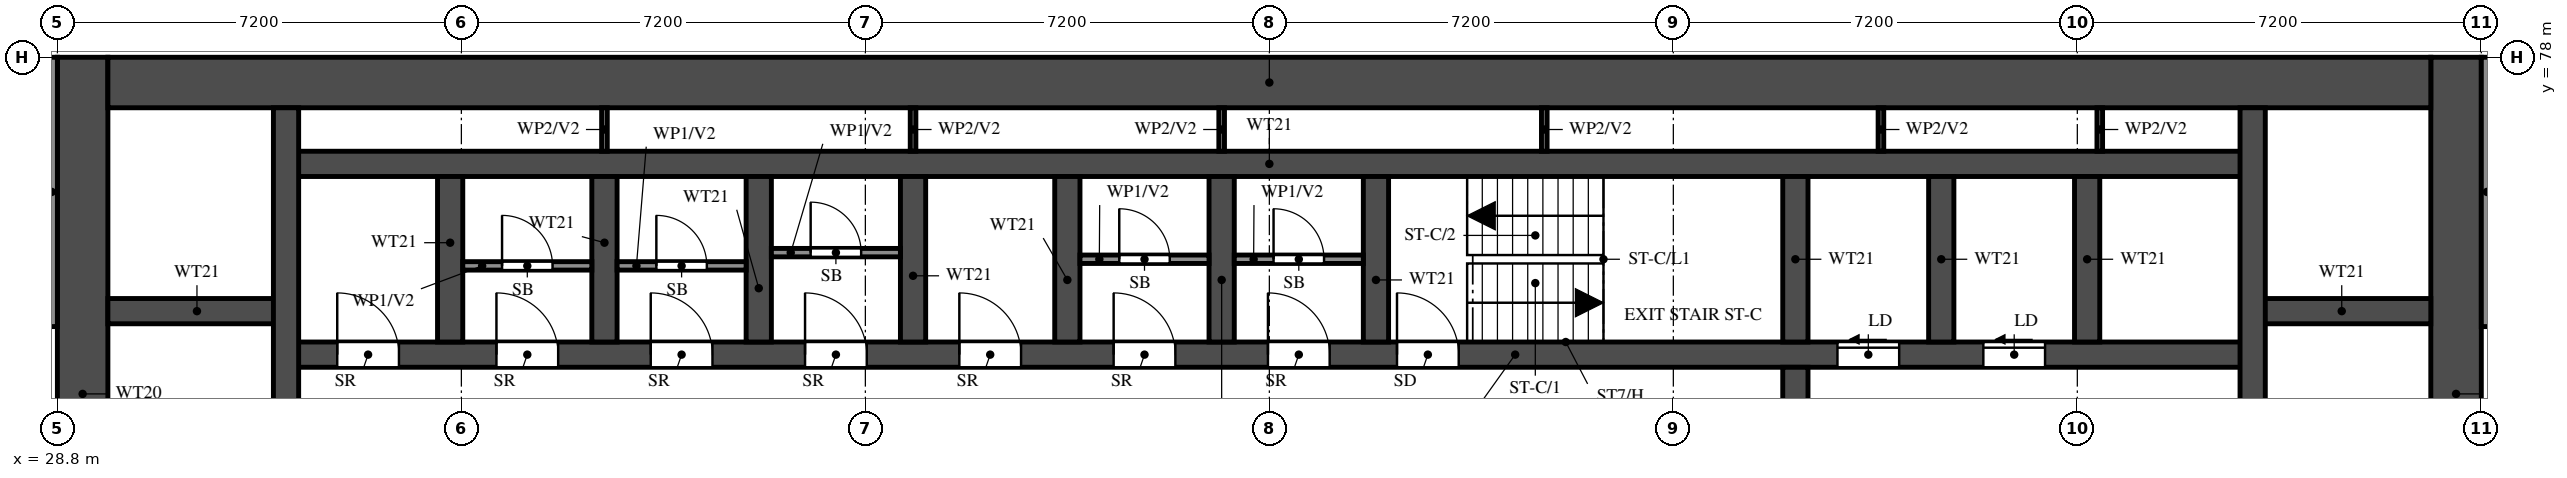
"""IFC4 building model, lengths in metres.
Left out: names, types, materials, properties, quantities, classifications, styles, units other than length and angle.
Written with IfcOpenShell. Run it as: python <this file> out.ifc"""

import sys

from ifc_helpers import new_model, si_unit, direction, frame, frame_2d, origin, place, context, subcontext, project, spatial, rectangle, extrude, element, fill, save


model = new_model("IFC4")
c1 = context("Model", 3, precision=1e-05, world=origin(), true_north=direction((0.0, 1.0)))
c2 = subcontext(c1, "Body", "Model", "MODEL_VIEW")
j1 = project(units=[si_unit("LENGTHUNIT", "METRE"), si_unit("PLANEANGLEUNIT", "RADIAN")], contexts=[c1])
p1 = place(None, origin())
s1 = spatial("IfcSite", under=j1, at=p1, CompositionType="ELEMENT")
p2 = place(p1, origin())
s2 = spatial("IfcBuilding", under=s1, at=p2, CompositionType="ELEMENT")
p3 = place(p2, frame((0.0, 0.0, 55.0)))
s3 = spatial("IfcBuildingStorey", under=s2, at=p3, CompositionType="ELEMENT", Elevation=55.0)
for number, where, z_axis, x_axis in (
    (1, (29.25, 66.0, 0.0), (0.0, 0.0, 1.0), (0.0, 1.0, 0.0)),
    (2, (71.55, 66.0, 0.0), (0.0, 0.0, 1.0), (0.0, 1.0, 0.0)),
):
    element("IfcWall", number, at=place(p3, frame(where, z_axis=z_axis, x_axis=x_axis)), inside=s3, PredefinedType="SHEAR", context=c2, shape_type="SweptSolid", body=[
        extrude(rectangle(XDim=12.0, YDim=0.9, at=frame_2d((6.0, 0.0))), origin(), (0.0, 0.0, 1.0), 3.18),
    ])
p4 = place(p3, frame((29.7, 77.55, 0.0), z_axis=(0.0, 0.0, 1.0), x_axis=(1.0, 0.0, 0.0)))
e3 = element("IfcWall", 3, at=p4, inside=s3, PredefinedType="SHEAR", context=c2, shape_type="SweptSolid", body=[
    extrude(rectangle(XDim=41.4, YDim=0.9, at=frame_2d((20.7, 0.0))), origin(), (0.0, 0.0, 1.0), 3.18),
])
p5 = place(p3, frame((32.875, 72.7, 0.0), z_axis=(0.0, 0.0, 1.0), x_axis=(1.0, 0.0, 0.0)))
e4 = element("IfcWall", 4, at=p5, inside=s3, PredefinedType="SHEAR", context=c2, shape_type="SweptSolid", body=[
    extrude(rectangle(XDim=35.05, YDim=0.45, at=frame_2d((17.525, 0.0))), origin(), (0.0, 0.0, 1.0), 3.18),
])
p6 = place(p5, frame((19.8, 0.0, 0.0)))
e5 = element("IfcOpeningElement", 5, at=p6, cuts=e4, PredefinedType="OPENING", context=c2, shape_type="SweptSolid", body=[
    extrude(rectangle(XDim=1.1, YDim=2.1, at=frame_2d((0.55, 1.05))), frame((0.0, 0.235, 0.0), z_axis=(0.0, -1.0, 0.0), x_axis=(1.0, 0.0, 0.0)), (0.0, 0.0, 1.0), 0.47),
])
p7 = place(p5, frame((27.65, 0.0, 0.0)))
e6 = element("IfcOpeningElement", 6, at=p7, cuts=e4, PredefinedType="OPENING", context=c2, shape_type="SweptSolid", body=[
    extrude(rectangle(XDim=1.1, YDim=2.1, at=frame_2d((0.55, 1.05))), frame((0.0, 0.235, 0.0), z_axis=(0.0, -1.0, 0.0), x_axis=(1.0, 0.0, 0.0)), (0.0, 0.0, 1.0), 0.47),
])
p8 = place(p5, frame((30.25, 0.0, 0.0)))
e7 = element("IfcOpeningElement", 7, at=p8, cuts=e4, PredefinedType="OPENING", context=c2, shape_type="SweptSolid", body=[
    extrude(rectangle(XDim=1.1, YDim=2.1, at=frame_2d((0.55, 1.05))), frame((0.0, 0.235, 0.0), z_axis=(0.0, -1.0, 0.0), x_axis=(1.0, 0.0, 0.0)), (0.0, 0.0, 1.0), 0.47),
])
p9 = place(p5, frame((3.75, 0.0, 0.0)))
e8 = element("IfcOpeningElement", 8, at=p9, cuts=e4, PredefinedType="OPENING", context=c2, shape_type="SweptSolid", body=[
    extrude(rectangle(XDim=1.1, YDim=2.1, at=frame_2d((0.55, 1.05))), frame((0.0, 0.235, 0.0), z_axis=(0.0, -1.0, 0.0), x_axis=(1.0, 0.0, 0.0)), (0.0, 0.0, 1.0), 0.47),
])
p10 = place(p5, frame((6.5, 0.0, 0.0)))
e9 = element("IfcOpeningElement", 9, at=p10, cuts=e4, PredefinedType="OPENING", context=c2, shape_type="SweptSolid", body=[
    extrude(rectangle(XDim=1.1, YDim=2.1, at=frame_2d((0.55, 1.05))), frame((0.0, 0.235, 0.0), z_axis=(0.0, -1.0, 0.0), x_axis=(1.0, 0.0, 0.0)), (0.0, 0.0, 1.0), 0.47),
])
p11 = place(p5, frame((9.25, 0.0, 0.0)))
e10 = element("IfcOpeningElement", 10, at=p11, cuts=e4, PredefinedType="OPENING", context=c2, shape_type="SweptSolid", body=[
    extrude(rectangle(XDim=1.1, YDim=2.1, at=frame_2d((0.55, 1.05))), frame((0.0, 0.235, 0.0), z_axis=(0.0, -1.0, 0.0), x_axis=(1.0, 0.0, 0.0)), (0.0, 0.0, 1.0), 0.47),
])
p12 = place(p5, frame((12.0, 0.0, 0.0)))
e11 = element("IfcOpeningElement", 11, at=p12, cuts=e4, PredefinedType="OPENING", context=c2, shape_type="SweptSolid", body=[
    extrude(rectangle(XDim=1.1, YDim=2.1, at=frame_2d((0.55, 1.05))), frame((0.0, 0.235, 0.0), z_axis=(0.0, -1.0, 0.0), x_axis=(1.0, 0.0, 0.0)), (0.0, 0.0, 1.0), 0.47),
])
p13 = place(p5, frame((14.75, 0.0, 0.0)))
e12 = element("IfcOpeningElement", 12, at=p13, cuts=e4, PredefinedType="OPENING", context=c2, shape_type="SweptSolid", body=[
    extrude(rectangle(XDim=1.1, YDim=2.1, at=frame_2d((0.55, 1.05))), frame((0.0, 0.235, 0.0), z_axis=(0.0, -1.0, 0.0), x_axis=(1.0, 0.0, 0.0)), (0.0, 0.0, 1.0), 0.47),
])
p14 = place(p5, frame((17.5, 0.0, 0.0)))
e13 = element("IfcOpeningElement", 13, at=p14, cuts=e4, PredefinedType="OPENING", context=c2, shape_type="SweptSolid", body=[
    extrude(rectangle(XDim=1.1, YDim=2.1, at=frame_2d((0.55, 1.05))), frame((0.0, 0.235, 0.0), z_axis=(0.0, -1.0, 0.0), x_axis=(1.0, 0.0, 0.0)), (0.0, 0.0, 1.0), 0.47),
])
p15 = place(p5, frame((0.913, 0.0, 0.0)))
e14 = element("IfcOpeningElement", 14, at=p15, cuts=e4, PredefinedType="OPENING", context=c2, shape_type="SweptSolid", body=[
    extrude(rectangle(XDim=1.1, YDim=2.1, at=frame_2d((0.55, 1.05))), frame((0.0, 0.235, 0.0), z_axis=(0.0, -1.0, 0.0), x_axis=(1.0, 0.0, 0.0)), (0.0, 0.0, 1.0), 0.47),
])
p16 = place(p3, frame((32.875, 76.1, 0.0), z_axis=(0.0, 0.0, 1.0), x_axis=(1.0, 0.0, 0.0)))
e15 = element("IfcWall", 15, at=p16, inside=s3, PredefinedType="SHEAR", context=c2, shape_type="SweptSolid", body=[
    extrude(rectangle(XDim=35.05, YDim=0.45, at=frame_2d((17.525, 0.0))), origin(), (0.0, 0.0, 1.0), 3.18),
])
for number, where, z_axis, x_axis in (
    (16, (29.7, 73.475, 0.0), (0.0, 0.0, 1.0), (1.0, 0.0, 0.0)),
    (17, (67.925, 73.475, 0.0), (0.0, 0.0, 1.0), (1.0, 0.0, 0.0)),
):
    element("IfcWall", number, at=place(p3, frame(where, z_axis=z_axis, x_axis=x_axis)), inside=s3, PredefinedType="SHEAR", context=c2, shape_type="SweptSolid", body=[
        extrude(rectangle(XDim=3.175, YDim=0.45, at=frame_2d((1.587, 0.0))), origin(), (0.0, 0.0, 1.0), 3.18),
    ])
p17 = place(p3, frame((32.875, 66.45, 0.0), z_axis=(0.0, 0.0, 1.0), x_axis=(0.0, 1.0, 0.0)))
e18 = element("IfcWall", 18, at=p17, inside=s3, PredefinedType="SHEAR", context=c2, shape_type="SweptSolid", body=[
    extrude(rectangle(XDim=10.65, YDim=0.45, at=frame_2d((5.325, 0.0))), origin(), (0.0, 0.0, 1.0), 3.18),
])
p18 = place(p3, frame((67.925, 66.45, 0.0), z_axis=(0.0, 0.0, 1.0), x_axis=(0.0, 1.0, 0.0)))
e19 = element("IfcWall", 19, at=p18, inside=s3, PredefinedType="SHEAR", context=c2, shape_type="SweptSolid", body=[
    extrude(rectangle(XDim=10.65, YDim=0.45, at=frame_2d((5.325, 0.0))), origin(), (0.0, 0.0, 1.0), 3.18),
])
p19 = place(p18, frame((0.15, 0.0, 0.0)))
e20 = element("IfcOpeningElement", 20, at=p19, cuts=e19, PredefinedType="OPENING", context=c2, shape_type="SweptSolid", body=[
    extrude(rectangle(XDim=1.1, YDim=2.1, at=frame_2d((0.55, 1.05))), frame((0.0, 0.235, 0.0), z_axis=(0.0, -1.0, 0.0), x_axis=(1.0, 0.0, 0.0)), (0.0, 0.0, 1.0), 0.47),
])
p20 = place(p3, frame((59.775, 66.45, 0.0), z_axis=(0.0, 0.0, 1.0), x_axis=(0.0, 1.0, 0.0)))
e21 = element("IfcWall", 21, at=p20, inside=s3, PredefinedType="SHEAR", context=c2, shape_type="SweptSolid", body=[
    extrude(rectangle(XDim=6.025, YDim=0.45, at=frame_2d((3.013, 0.0))), origin(), (0.0, 0.0, 1.0), 3.18),
])
p21 = place(p20, frame((3.85, 0.0, 0.0)))
e22 = element("IfcOpeningElement", 22, at=p21, cuts=e21, PredefinedType="OPENING", context=c2, shape_type="SweptSolid", body=[
    extrude(rectangle(XDim=1.2, YDim=2.1, at=frame_2d((0.6, 1.05))), frame((0.0, 0.235, 0.0), z_axis=(0.0, -1.0, 0.0), x_axis=(1.0, 0.0, 0.0)), (0.0, 0.0, 1.0), 0.47),
])
for number, where, z_axis, x_axis in (
    (23, (59.775, 72.925, 0.0), (0.0, 0.0, 1.0), (0.0, 1.0, 0.0)),
    (24, (35.8, 72.925, 0.0), (0.0, 0.0, 1.0), (0.0, 1.0, 0.0)),
    (25, (38.55, 72.925, 0.0), (0.0, 0.0, 1.0), (0.0, 1.0, 0.0)),
    (26, (41.3, 72.925, 0.0), (0.0, 0.0, 1.0), (0.0, 1.0, 0.0)),
    (27, (44.05, 72.925, 0.0), (0.0, 0.0, 1.0), (0.0, 1.0, 0.0)),
    (28, (46.8, 72.925, 0.0), (0.0, 0.0, 1.0), (0.0, 1.0, 0.0)),
    (29, (49.55, 72.925, 0.0), (0.0, 0.0, 1.0), (0.0, 1.0, 0.0)),
    (30, (52.3, 72.925, 0.0), (0.0, 0.0, 1.0), (0.0, 1.0, 0.0)),
    (31, (62.375, 72.925, 0.0), (0.0, 0.0, 1.0), (0.0, 1.0, 0.0)),
    (32, (64.975, 72.925, 0.0), (0.0, 0.0, 1.0), (0.0, 1.0, 0.0)),
):
    element("IfcWall", number, at=place(p3, frame(where, z_axis=z_axis, x_axis=x_axis)), inside=s3, PredefinedType="SHEAR", context=c2, shape_type="SweptSolid", body=[
        extrude(rectangle(XDim=2.95, YDim=0.45, at=frame_2d((1.475, 0.0))), origin(), (0.0, 0.0, 1.0), 3.18),
    ])
p22 = place(p3, frame((36.025, 74.282, 0.0), z_axis=(0.0, 0.0, 1.0), x_axis=(1.0, 0.0, 0.0)))
e33 = element("IfcWall", 33, at=p22, inside=s3, PredefinedType="PARTITIONING", context=c2, shape_type="SweptSolid", body=[
    extrude(rectangle(XDim=2.3, YDim=0.15, at=frame_2d((1.15, 0.0))), origin(), (0.0, 0.0, 1.0), 3.18),
])
p23 = place(p22, frame((0.7, 0.0, 0.0)))
e34 = element("IfcOpeningElement", 34, at=p23, cuts=e33, PredefinedType="OPENING", context=c2, shape_type="SweptSolid", body=[
    extrude(rectangle(XDim=0.9, YDim=2.1, at=frame_2d((0.45, 1.05))), frame((0.0, 0.085, 0.0), z_axis=(0.0, -1.0, 0.0), x_axis=(1.0, 0.0, 0.0)), (0.0, 0.0, 1.0), 0.17),
])
p24 = place(p3, frame((38.775, 74.282, 0.0), z_axis=(0.0, 0.0, 1.0), x_axis=(1.0, 0.0, 0.0)))
e35 = element("IfcWall", 35, at=p24, inside=s3, PredefinedType="PARTITIONING", context=c2, shape_type="SweptSolid", body=[
    extrude(rectangle(XDim=2.3, YDim=0.15, at=frame_2d((1.15, 0.0))), origin(), (0.0, 0.0, 1.0), 3.18),
])
p25 = place(p24, frame((0.7, 0.0, 0.0)))
e36 = element("IfcOpeningElement", 36, at=p25, cuts=e35, PredefinedType="OPENING", context=c2, shape_type="SweptSolid", body=[
    extrude(rectangle(XDim=0.9, YDim=2.1, at=frame_2d((0.45, 1.05))), frame((0.0, 0.085, 0.0), z_axis=(0.0, -1.0, 0.0), x_axis=(1.0, 0.0, 0.0)), (0.0, 0.0, 1.0), 0.17),
])
p26 = place(p3, frame((41.525, 74.518, 0.0), z_axis=(0.0, 0.0, 1.0), x_axis=(1.0, 0.0, 0.0)))
e37 = element("IfcWall", 37, at=p26, inside=s3, PredefinedType="PARTITIONING", context=c2, shape_type="SweptSolid", body=[
    extrude(rectangle(XDim=2.3, YDim=0.15, at=frame_2d((1.15, 0.0))), origin(), (0.0, 0.0, 1.0), 3.18),
])
p27 = place(p26, frame((0.7, 0.0, 0.0)))
e38 = element("IfcOpeningElement", 38, at=p27, cuts=e37, PredefinedType="OPENING", context=c2, shape_type="SweptSolid", body=[
    extrude(rectangle(XDim=0.9, YDim=2.1, at=frame_2d((0.45, 1.05))), frame((0.0, 0.085, 0.0), z_axis=(0.0, -1.0, 0.0), x_axis=(1.0, 0.0, 0.0)), (0.0, 0.0, 1.0), 0.17),
])
p28 = place(p3, frame((47.025, 74.4, 0.0), z_axis=(0.0, 0.0, 1.0), x_axis=(1.0, 0.0, 0.0)))
e39 = element("IfcWall", 39, at=p28, inside=s3, PredefinedType="PARTITIONING", context=c2, shape_type="SweptSolid", body=[
    extrude(rectangle(XDim=2.3, YDim=0.15, at=frame_2d((1.15, 0.0))), origin(), (0.0, 0.0, 1.0), 3.18),
])
p29 = place(p28, frame((0.7, 0.0, 0.0)))
e40 = element("IfcOpeningElement", 40, at=p29, cuts=e39, PredefinedType="OPENING", context=c2, shape_type="SweptSolid", body=[
    extrude(rectangle(XDim=0.9, YDim=2.1, at=frame_2d((0.45, 1.05))), frame((0.0, 0.085, 0.0), z_axis=(0.0, -1.0, 0.0), x_axis=(1.0, 0.0, 0.0)), (0.0, 0.0, 1.0), 0.17),
])
p30 = place(p3, frame((49.775, 74.4, 0.0), z_axis=(0.0, 0.0, 1.0), x_axis=(1.0, 0.0, 0.0)))
e41 = element("IfcWall", 41, at=p30, inside=s3, PredefinedType="PARTITIONING", context=c2, shape_type="SweptSolid", body=[
    extrude(rectangle(XDim=2.3, YDim=0.15, at=frame_2d((1.15, 0.0))), origin(), (0.0, 0.0, 1.0), 3.18),
])
p31 = place(p30, frame((0.7, 0.0, 0.0)))
e42 = element("IfcOpeningElement", 42, at=p31, cuts=e41, PredefinedType="OPENING", context=c2, shape_type="SweptSolid", body=[
    extrude(rectangle(XDim=0.9, YDim=2.1, at=frame_2d((0.45, 1.05))), frame((0.0, 0.085, 0.0), z_axis=(0.0, -1.0, 0.0), x_axis=(1.0, 0.0, 0.0)), (0.0, 0.0, 1.0), 0.17),
])
for number, where, z_axis, x_axis in (
    (43, (38.55, 76.325, 0.0), (0.0, 0.0, 1.0), (0.0, 1.0, 0.0)),
    (44, (44.05, 76.325, 0.0), (0.0, 0.0, 1.0), (0.0, 1.0, 0.0)),
    (45, (49.55, 76.325, 0.0), (0.0, 0.0, 1.0), (0.0, 1.0, 0.0)),
    (46, (55.3, 76.325, 0.0), (0.0, 0.0, 1.0), (0.0, 1.0, 0.0)),
    (47, (61.3, 76.325, 0.0), (0.0, 0.0, 1.0), (0.0, 1.0, 0.0)),
    (48, (65.2, 76.325, 0.0), (0.0, 0.0, 1.0), (0.0, 1.0, 0.0)),
):
    element("IfcWall", number, at=place(p3, frame(where, z_axis=z_axis, x_axis=x_axis)), inside=s3, PredefinedType="PARTITIONING", context=c2, shape_type="SweptSolid", body=[
        extrude(rectangle(XDim=0.775, YDim=0.1, at=frame_2d((0.388, 0.0))), origin(), (0.0, 0.0, 1.0), 3.18),
    ])
for number, where, z_axis, x_axis in (
    (49, (28.7, 73.2, 0.0), (0.0, 0.0, 1.0), (0.0, 1.0, 0.0)),
    (50, (72.1, 73.2, 0.0), (0.0, 0.0, 1.0), (0.0, 1.0, 0.0)),
):
    element("IfcWall", number, at=place(p3, frame(where, z_axis=z_axis, x_axis=x_axis)), inside=s3, PredefinedType="SOLIDWALL", context=c2, shape_type="SweptSolid", body=[
        extrude(rectangle(XDim=4.8, YDim=0.2, at=frame_2d((2.4, 0.0))), origin(), (0.0, 0.0, 1.0), 3.18),
    ])
p32 = place(p6, origin())
e51 = element("IfcDoor", 51, at=p32, inside=s3, OperationType="SINGLE_SWING_LEFT", PredefinedType="DOOR", context=c2, shape_type="SweptSolid", body=[
    extrude(rectangle(XDim=1.1, YDim=2.1, at=frame_2d((0.55, 1.05))), frame((0.0, 0.025, 0.0), z_axis=(0.0, -1.0, 0.0), x_axis=(1.0, 0.0, 0.0)), (0.0, 0.0, 1.0), 0.05),
])
fill(e5, e51)
p33 = place(p7, origin())
e52 = element("IfcDoor", 52, at=p33, inside=s3, OperationType="SLIDING_TO_LEFT", PredefinedType="DOOR", context=c2, shape_type="SweptSolid", body=[
    extrude(rectangle(XDim=1.1, YDim=2.1, at=frame_2d((0.55, 1.05))), frame((0.0, 0.025, 0.0), z_axis=(0.0, -1.0, 0.0), x_axis=(1.0, 0.0, 0.0)), (0.0, 0.0, 1.0), 0.05),
])
fill(e6, e52)
p34 = place(p8, origin())
e53 = element("IfcDoor", 53, at=p34, inside=s3, OperationType="SLIDING_TO_LEFT", PredefinedType="DOOR", context=c2, shape_type="SweptSolid", body=[
    extrude(rectangle(XDim=1.1, YDim=2.1, at=frame_2d((0.55, 1.05))), frame((0.0, 0.025, 0.0), z_axis=(0.0, -1.0, 0.0), x_axis=(1.0, 0.0, 0.0)), (0.0, 0.0, 1.0), 0.05),
])
fill(e7, e53)
p35 = place(p9, origin())
e54 = element("IfcDoor", 54, at=p35, inside=s3, OperationType="SINGLE_SWING_LEFT", PredefinedType="DOOR", context=c2, shape_type="SweptSolid", body=[
    extrude(rectangle(XDim=1.1, YDim=2.1, at=frame_2d((0.55, 1.05))), frame((0.0, 0.025, 0.0), z_axis=(0.0, -1.0, 0.0), x_axis=(1.0, 0.0, 0.0)), (0.0, 0.0, 1.0), 0.05),
])
fill(e8, e54)
p36 = place(p23, origin())
e55 = element("IfcDoor", 55, at=p36, inside=s3, OperationType="SINGLE_SWING_LEFT", PredefinedType="DOOR", context=c2, shape_type="SweptSolid", body=[
    extrude(rectangle(XDim=0.9, YDim=2.1, at=frame_2d((0.45, 1.05))), frame((0.0, 0.025, 0.0), z_axis=(0.0, -1.0, 0.0), x_axis=(1.0, 0.0, 0.0)), (0.0, 0.0, 1.0), 0.05),
])
fill(e34, e55)
p37 = place(p10, origin())
e56 = element("IfcDoor", 56, at=p37, inside=s3, OperationType="SINGLE_SWING_LEFT", PredefinedType="DOOR", context=c2, shape_type="SweptSolid", body=[
    extrude(rectangle(XDim=1.1, YDim=2.1, at=frame_2d((0.55, 1.05))), frame((0.0, 0.025, 0.0), z_axis=(0.0, -1.0, 0.0), x_axis=(1.0, 0.0, 0.0)), (0.0, 0.0, 1.0), 0.05),
])
fill(e9, e56)
p38 = place(p25, origin())
e57 = element("IfcDoor", 57, at=p38, inside=s3, OperationType="SINGLE_SWING_RIGHT", PredefinedType="DOOR", context=c2, shape_type="SweptSolid", body=[
    extrude(rectangle(XDim=0.9, YDim=2.1, at=frame_2d((0.45, 1.05))), frame((0.0, 0.025, 0.0), z_axis=(0.0, -1.0, 0.0), x_axis=(1.0, 0.0, 0.0)), (0.0, 0.0, 1.0), 0.05),
])
fill(e36, e57)
p39 = place(p11, origin())
e58 = element("IfcDoor", 58, at=p39, inside=s3, OperationType="SINGLE_SWING_LEFT", PredefinedType="DOOR", context=c2, shape_type="SweptSolid", body=[
    extrude(rectangle(XDim=1.1, YDim=2.1, at=frame_2d((0.55, 1.05))), frame((0.0, 0.025, 0.0), z_axis=(0.0, -1.0, 0.0), x_axis=(1.0, 0.0, 0.0)), (0.0, 0.0, 1.0), 0.05),
])
fill(e10, e58)
p40 = place(p27, origin())
e59 = element("IfcDoor", 59, at=p40, inside=s3, OperationType="SINGLE_SWING_RIGHT", PredefinedType="DOOR", context=c2, shape_type="SweptSolid", body=[
    extrude(rectangle(XDim=0.9, YDim=2.1, at=frame_2d((0.45, 1.05))), frame((0.0, 0.025, 0.0), z_axis=(0.0, -1.0, 0.0), x_axis=(1.0, 0.0, 0.0)), (0.0, 0.0, 1.0), 0.05),
])
fill(e38, e59)
p41 = place(p12, origin())
e60 = element("IfcDoor", 60, at=p41, inside=s3, OperationType="SINGLE_SWING_LEFT", PredefinedType="DOOR", context=c2, shape_type="SweptSolid", body=[
    extrude(rectangle(XDim=1.1, YDim=2.1, at=frame_2d((0.55, 1.05))), frame((0.0, 0.025, 0.0), z_axis=(0.0, -1.0, 0.0), x_axis=(1.0, 0.0, 0.0)), (0.0, 0.0, 1.0), 0.05),
])
fill(e11, e60)
p42 = place(p13, origin())
e61 = element("IfcDoor", 61, at=p42, inside=s3, OperationType="SINGLE_SWING_LEFT", PredefinedType="DOOR", context=c2, shape_type="SweptSolid", body=[
    extrude(rectangle(XDim=1.1, YDim=2.1, at=frame_2d((0.55, 1.05))), frame((0.0, 0.025, 0.0), z_axis=(0.0, -1.0, 0.0), x_axis=(1.0, 0.0, 0.0)), (0.0, 0.0, 1.0), 0.05),
])
fill(e12, e61)
p43 = place(p29, origin())
e62 = element("IfcDoor", 62, at=p43, inside=s3, OperationType="SINGLE_SWING_LEFT", PredefinedType="DOOR", context=c2, shape_type="SweptSolid", body=[
    extrude(rectangle(XDim=0.9, YDim=2.1, at=frame_2d((0.45, 1.05))), frame((0.0, 0.025, 0.0), z_axis=(0.0, -1.0, 0.0), x_axis=(1.0, 0.0, 0.0)), (0.0, 0.0, 1.0), 0.05),
])
fill(e40, e62)
p44 = place(p14, origin())
e63 = element("IfcDoor", 63, at=p44, inside=s3, OperationType="SINGLE_SWING_LEFT", PredefinedType="DOOR", context=c2, shape_type="SweptSolid", body=[
    extrude(rectangle(XDim=1.1, YDim=2.1, at=frame_2d((0.55, 1.05))), frame((0.0, 0.025, 0.0), z_axis=(0.0, -1.0, 0.0), x_axis=(1.0, 0.0, 0.0)), (0.0, 0.0, 1.0), 0.05),
])
fill(e13, e63)
p45 = place(p31, origin())
e64 = element("IfcDoor", 64, at=p45, inside=s3, OperationType="SINGLE_SWING_RIGHT", PredefinedType="DOOR", context=c2, shape_type="SweptSolid", body=[
    extrude(rectangle(XDim=0.9, YDim=2.1, at=frame_2d((0.45, 1.05))), frame((0.0, 0.025, 0.0), z_axis=(0.0, -1.0, 0.0), x_axis=(1.0, 0.0, 0.0)), (0.0, 0.0, 1.0), 0.05),
])
fill(e42, e64)
p46 = place(p15, origin())
e65 = element("IfcDoor", 65, at=p46, inside=s3, OperationType="SINGLE_SWING_LEFT", PredefinedType="DOOR", context=c2, shape_type="SweptSolid", body=[
    extrude(rectangle(XDim=1.1, YDim=2.1, at=frame_2d((0.55, 1.05))), frame((0.0, 0.025, 0.0), z_axis=(0.0, -1.0, 0.0), x_axis=(1.0, 0.0, 0.0)), (0.0, 0.0, 1.0), 0.05),
])
fill(e14, e65)
save(model, sys.argv[1])
